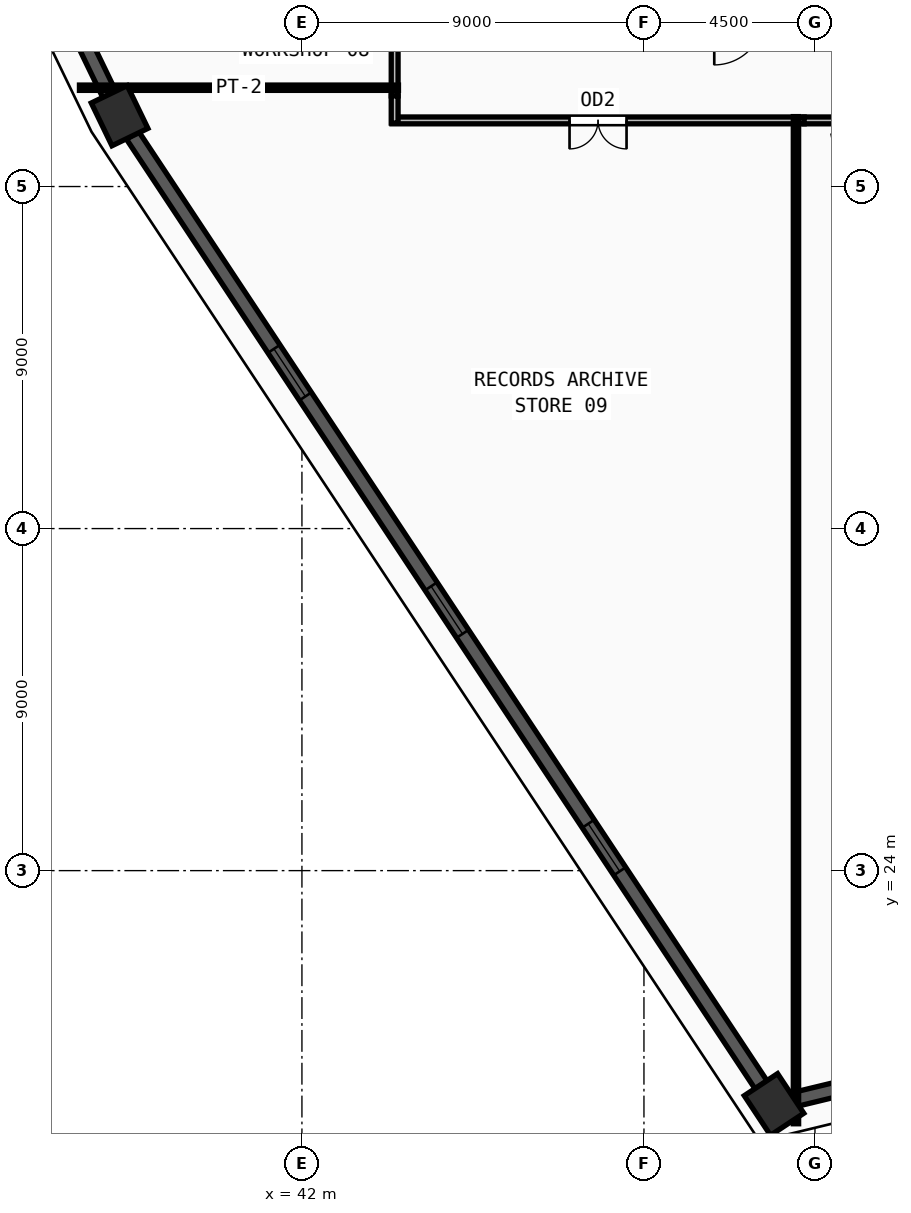
"""IFC4 building model, lengths in metres.
Left out: names, types, materials, properties, quantities, classifications, styles, units other than length and angle.
Written with IfcOpenShell. Run it as: python <this file> out.ifc"""

import sys

from ifc_helpers import new_model, si_unit, direction, frame, frame_2d, origin, origin_2d, place, context, subcontext, project, spatial, rectangle, extrude, source, transform, mapped, element, fill, save


model = new_model("IFC4")
c1 = context("Model", 3, precision=1e-05, world=origin(), true_north=direction((0.0, 1.0)))
c2 = subcontext(c1, "Body", "Model", "MODEL_VIEW")
j1 = project(units=[si_unit("LENGTHUNIT", "METRE"), si_unit("PLANEANGLEUNIT", "RADIAN")], contexts=[c1])
p1 = place(None, origin())
s1 = spatial("IfcSite", under=j1, at=p1, CompositionType="ELEMENT")
p2 = place(p1, origin())
s2 = spatial("IfcBuilding", under=s1, at=p2, CompositionType="ELEMENT")
p3 = place(p2, frame((0.0, 0.0, 194.25)))
s3 = spatial("IfcBuildingStorey", under=s2, at=p3, CompositionType="ELEMENT", Elevation=194.25)
m1 = source(origin(), c2, "Body", "SweptSolid", [
    extrude(rectangle(XDim=1.25, YDim=1.05, at=origin_2d()), origin(), (0.0, 0.0, 1.0), 3.75),
])
for number, where, z_axis, x_axis in (
    (1, (54.423, 17.847, 0.0), (0.0, 0.0, 1.0), (-0.552, 0.834, 0.0)),
    (2, (37.202, 43.864, 0.0), (0.0, 0.0, 1.0), (-0.435, 0.9, 0.0)),
):
    element("IfcColumn", number, at=place(p3, frame(where, z_axis=z_axis, x_axis=x_axis)), inside=s3, PredefinedType="COLUMN", context=c2, shape_type="MappedRepresentation", body=[
        mapped(m1, transform((0.0, 0.0, 0.0), x_axis=(1.0, 0.0, 0.0), y_axis=(0.0, 1.0, 0.0), z_axis=(0.0, 0.0, 1.0), scale=1.0)),
    ])
p4 = place(p3, frame((26.164, 66.687, 0.0), z_axis=(0.0, 0.0, 1.0), x_axis=(0.43538652966, -0.900243616912, 0.0)))
e3 = element("IfcWall", 3, at=p4, inside=s3, PredefinedType="SOLIDWALL", context=c2, shape_type="SweptSolid", body=[
    extrude(rectangle(XDim=24.737, YDim=0.38, at=frame_2d((12.368, 0.0))), origin(), (0.0, 0.0, 1.0), 3.57),
])
m2 = source(origin(), c2, "Body", "SweptSolid", [
    extrude(rectangle(XDim=1.5, YDim=1.9, at=frame_2d((0.75, 0.95))), frame((0.0, 0.2, 0.0), z_axis=(0.0, -1.0, 0.0), x_axis=(1.0, 0.0, 0.0)), (0.0, 0.0, 1.0), 0.4),
])
p5 = place(p4, frame((5.434, 0.0, 0.55)))
e4 = element("IfcOpeningElement", 4, at=p5, cuts=e3, PredefinedType="OPENING", context=c2, shape_type="MappedRepresentation", body=[
    mapped(m2, transform((0.0, 0.0, 0.0), x_axis=(1.0, 0.0, 0.0), y_axis=(0.0, 1.0, 0.0), z_axis=(0.0, 0.0, 1.0), scale=1.0)),
])
p6 = place(p4, frame((11.618, 0.0, 0.55)))
e5 = element("IfcOpeningElement", 5, at=p6, cuts=e3, PredefinedType="OPENING", context=c2, shape_type="MappedRepresentation", body=[
    mapped(m2, transform((0.0, 0.0, 0.0), x_axis=(1.0, 0.0, 0.0), y_axis=(0.0, 1.0, 0.0), z_axis=(0.0, 0.0, 1.0), scale=1.0)),
])
p7 = place(p4, frame((15.602, 0.0, 0.55)))
e6 = element("IfcOpeningElement", 6, at=p7, cuts=e3, PredefinedType="OPENING", context=c2, shape_type="MappedRepresentation", body=[
    mapped(m2, transform((0.0, 0.0, 0.0), x_axis=(1.0, 0.0, 0.0), y_axis=(0.0, 1.0, 0.0), z_axis=(0.0, 0.0, 1.0), scale=1.0)),
])
p8 = place(p3, frame((37.541, 43.351, 0.0), z_axis=(0.0, 0.0, 1.0), x_axis=(0.551978948994, -0.833858045394, 0.0)))
e7 = element("IfcWall", 7, at=p8, inside=s3, PredefinedType="SOLIDWALL", context=c2, shape_type="SweptSolid", body=[
    extrude(rectangle(XDim=29.97, YDim=0.38, at=frame_2d((14.985, 0.0))), origin(), (0.0, 0.0, 1.0), 3.57),
])
p9 = place(p8, frame((6.743, 0.0, 0.55)))
e8 = element("IfcOpeningElement", 8, at=p9, cuts=e7, PredefinedType="OPENING", context=c2, shape_type="MappedRepresentation", body=[
    mapped(m2, transform((0.0, 0.0, 0.0), x_axis=(1.0, 0.0, 0.0), y_axis=(0.0, 1.0, 0.0), z_axis=(0.0, 0.0, 1.0), scale=1.0)),
])
p10 = place(p8, frame((14.235, 0.0, 0.55)))
e9 = element("IfcOpeningElement", 9, at=p10, cuts=e7, PredefinedType="OPENING", context=c2, shape_type="MappedRepresentation", body=[
    mapped(m2, transform((0.0, 0.0, 0.0), x_axis=(1.0, 0.0, 0.0), y_axis=(0.0, 1.0, 0.0), z_axis=(0.0, 0.0, 1.0), scale=1.0)),
])
p11 = place(p8, frame((21.728, 0.0, 0.55)))
e10 = element("IfcOpeningElement", 10, at=p11, cuts=e7, PredefinedType="OPENING", context=c2, shape_type="MappedRepresentation", body=[
    mapped(m2, transform((0.0, 0.0, 0.0), x_axis=(1.0, 0.0, 0.0), y_axis=(0.0, 1.0, 0.0), z_axis=(0.0, 0.0, 1.0), scale=1.0)),
])
p12 = place(p3, frame((55.021, 17.991, 0.0), z_axis=(0.0, 0.0, 1.0), x_axis=(0.972002486445, 0.234970564848, 0.0)))
e11 = element("IfcWall", 11, at=p12, inside=s3, PredefinedType="SOLIDWALL", context=c2, shape_type="SweptSolid", body=[
    extrude(rectangle(XDim=4.507, YDim=0.38, at=frame_2d((2.254, 0.0))), origin(), (0.0, 0.0, 1.0), 3.57),
])
m3 = source(origin(), c2, "Body", "SweptSolid", [
    extrude(rectangle(XDim=1.2, YDim=1.9, at=frame_2d((0.6, 0.95))), frame((0.0, 0.2, 0.0), z_axis=(0.0, -1.0, 0.0), x_axis=(1.0, 0.0, 0.0)), (0.0, 0.0, 1.0), 0.4),
])
p13 = place(p12, frame((1.654, 0.0, 0.55)))
e12 = element("IfcOpeningElement", 12, at=p13, cuts=e11, PredefinedType="OPENING", context=c2, shape_type="MappedRepresentation", body=[
    mapped(m3, transform((0.0, 0.0, 0.0), x_axis=(1.0, 0.0, 0.0), y_axis=(0.0, 1.0, 0.0), z_axis=(0.0, 0.0, 1.0), scale=1.0)),
])
p14 = place(p3, frame((55.215, 43.74, 0.0), z_axis=(0.0, 0.0, 1.0), x_axis=(-1.0, 0.0, 0.0)))
e13 = element("IfcWall", 13, at=p14, inside=s3, PredefinedType="PARTITIONING", context=c2, shape_type="SweptSolid", body=[
    extrude(rectangle(XDim=10.845, YDim=0.18, at=frame_2d((5.422, 0.0))), origin(), (0.0, 0.0, 1.0), 3.57),
])
m4 = source(origin(), c2, "Body", "SweptSolid", [
    extrude(rectangle(XDim=1.5, YDim=2.2, at=frame_2d((0.75, 1.1))), frame((0.0, 0.1, 0.0), z_axis=(0.0, -1.0, 0.0), x_axis=(1.0, 0.0, 0.0)), (0.0, 0.0, 1.0), 0.2),
])
p15 = place(p14, frame((4.673, 0.0, 0.0)))
e14 = element("IfcOpeningElement", 14, at=p15, cuts=e13, PredefinedType="OPENING", context=c2, shape_type="MappedRepresentation", body=[
    mapped(m4, transform((0.0, 0.0, 0.0), x_axis=(1.0, 0.0, 0.0), y_axis=(0.0, 1.0, 0.0), z_axis=(0.0, 0.0, 1.0), scale=1.0)),
])
p16 = place(p3, frame((75.63, 43.74, 0.0), z_axis=(0.0, 0.0, 1.0), x_axis=(-1.0, 0.0, 0.0)))
e15 = element("IfcWall", 15, at=p16, inside=s3, PredefinedType="PARTITIONING", context=c2, shape_type="SweptSolid", body=[
    extrude(rectangle(XDim=20.415, YDim=0.18, at=frame_2d((10.208, 0.0))), origin(), (0.0, 0.0, 1.0), 3.57),
])
p17 = place(p16, frame((9.457, 0.0, 0.0)))
e16 = element("IfcOpeningElement", 16, at=p17, cuts=e15, PredefinedType="OPENING", context=c2, shape_type="MappedRepresentation", body=[
    mapped(m4, transform((0.0, 0.0, 0.0), x_axis=(1.0, 0.0, 0.0), y_axis=(0.0, 1.0, 0.0), z_axis=(0.0, 0.0, 1.0), scale=1.0)),
])
p18 = place(p3, frame((44.44, 44.385, 0.0), z_axis=(0.0, 0.0, 1.0), x_axis=(0.0, 1.0, 0.0)))
e17 = element("IfcWall", 17, at=p18, inside=s3, PredefinedType="PARTITIONING", context=c2, shape_type="SweptSolid", body=[
    extrude(rectangle(XDim=3.825, YDim=0.18, at=frame_2d((1.913, 0.0))), origin(), (0.0, 0.0, 1.0), 3.205),
])
p19 = place(p3, frame((44.44, 43.67, 0.0), z_axis=(0.0, 0.0, 1.0), x_axis=(0.0, 1.0, 0.0)))
e18 = element("IfcWall", 18, at=p19, inside=s3, PredefinedType="PARTITIONING", context=c2, shape_type="SweptSolid", body=[
    extrude(rectangle(XDim=0.715, YDim=0.18, at=frame_2d((0.357, 0.0))), origin(), (0.0, 0.0, 1.0), 3.57),
])
p20 = place(p3, frame((44.54, 44.6, 0.0), z_axis=(0.0, 0.0, 1.0), x_axis=(-1.0, 0.0, 0.0)))
e19 = element("IfcWall", 19, at=p20, inside=s3, PredefinedType="PARTITIONING", context=c2, shape_type="SweptSolid", body=[
    extrude(rectangle(XDim=8.394, YDim=0.14, at=frame_2d((4.197, 0.0))), origin(), (0.0, 0.0, 1.0), 3.57),
])
p21 = place(p3, frame((55.0, 43.84, 0.0), z_axis=(0.0, 0.0, 1.0), x_axis=(0.0, -1.0, 0.0)))
e20 = element("IfcWall", 20, at=p21, inside=s3, PredefinedType="PARTITIONING", context=c2, shape_type="SweptSolid", body=[
    extrude(rectangle(XDim=26.501, YDim=0.14, at=frame_2d((13.25, 0.0))), origin(), (0.0, 0.0, 1.0), 3.57),
])
m5 = source(origin(), c2, "Body", "SweptSolid", [
    extrude(rectangle(XDim=1.5, YDim=1.9, at=frame_2d((0.75, 0.95))), frame((0.0, 0.03, 0.0), z_axis=(0.0, -1.0, 0.0), x_axis=(1.0, 0.0, 0.0)), (0.0, 0.0, 1.0), 0.06),
])
p22 = place(p9, origin())
e21 = element("IfcWindow", 21, at=p22, inside=s3, PartitioningType="DOUBLE_PANEL_VERTICAL", PredefinedType="WINDOW", context=c2, shape_type="MappedRepresentation", body=[
    mapped(m5, transform((0.0, 0.0, 0.0), x_axis=(1.0, 0.0, 0.0), y_axis=(0.0, 1.0, 0.0), z_axis=(0.0, 0.0, 1.0), scale=1.0)),
])
fill(e8, e21)
p23 = place(p10, origin())
e22 = element("IfcWindow", 22, at=p23, inside=s3, PartitioningType="DOUBLE_PANEL_VERTICAL", PredefinedType="WINDOW", context=c2, shape_type="MappedRepresentation", body=[
    mapped(m5, transform((0.0, 0.0, 0.0), x_axis=(1.0, 0.0, 0.0), y_axis=(0.0, 1.0, 0.0), z_axis=(0.0, 0.0, 1.0), scale=1.0)),
])
fill(e9, e22)
p24 = place(p11, origin())
e23 = element("IfcWindow", 23, at=p24, inside=s3, PartitioningType="DOUBLE_PANEL_VERTICAL", PredefinedType="WINDOW", context=c2, shape_type="MappedRepresentation", body=[
    mapped(m5, transform((0.0, 0.0, 0.0), x_axis=(1.0, 0.0, 0.0), y_axis=(0.0, 1.0, 0.0), z_axis=(0.0, 0.0, 1.0), scale=1.0)),
])
fill(e10, e23)
m6 = source(origin(), c2, "Body", "SweptSolid", [
    extrude(rectangle(XDim=1.5, YDim=2.2, at=frame_2d((0.75, 1.1))), frame((0.0, 0.025, 0.0), z_axis=(0.0, -1.0, 0.0), x_axis=(1.0, 0.0, 0.0)), (0.0, 0.0, 1.0), 0.05),
])
p25 = place(p15, origin())
e24 = element("IfcDoor", 24, at=p25, inside=s3, OperationType="DOUBLE_DOOR_SINGLE_SWING", PredefinedType="DOOR", context=c2, shape_type="MappedRepresentation", body=[
    mapped(m6, transform((0.0, 0.0, 0.0), x_axis=(1.0, 0.0, 0.0), y_axis=(0.0, 1.0, 0.0), z_axis=(0.0, 0.0, 1.0), scale=1.0)),
])
fill(e14, e24)
save(model, sys.argv[1])
